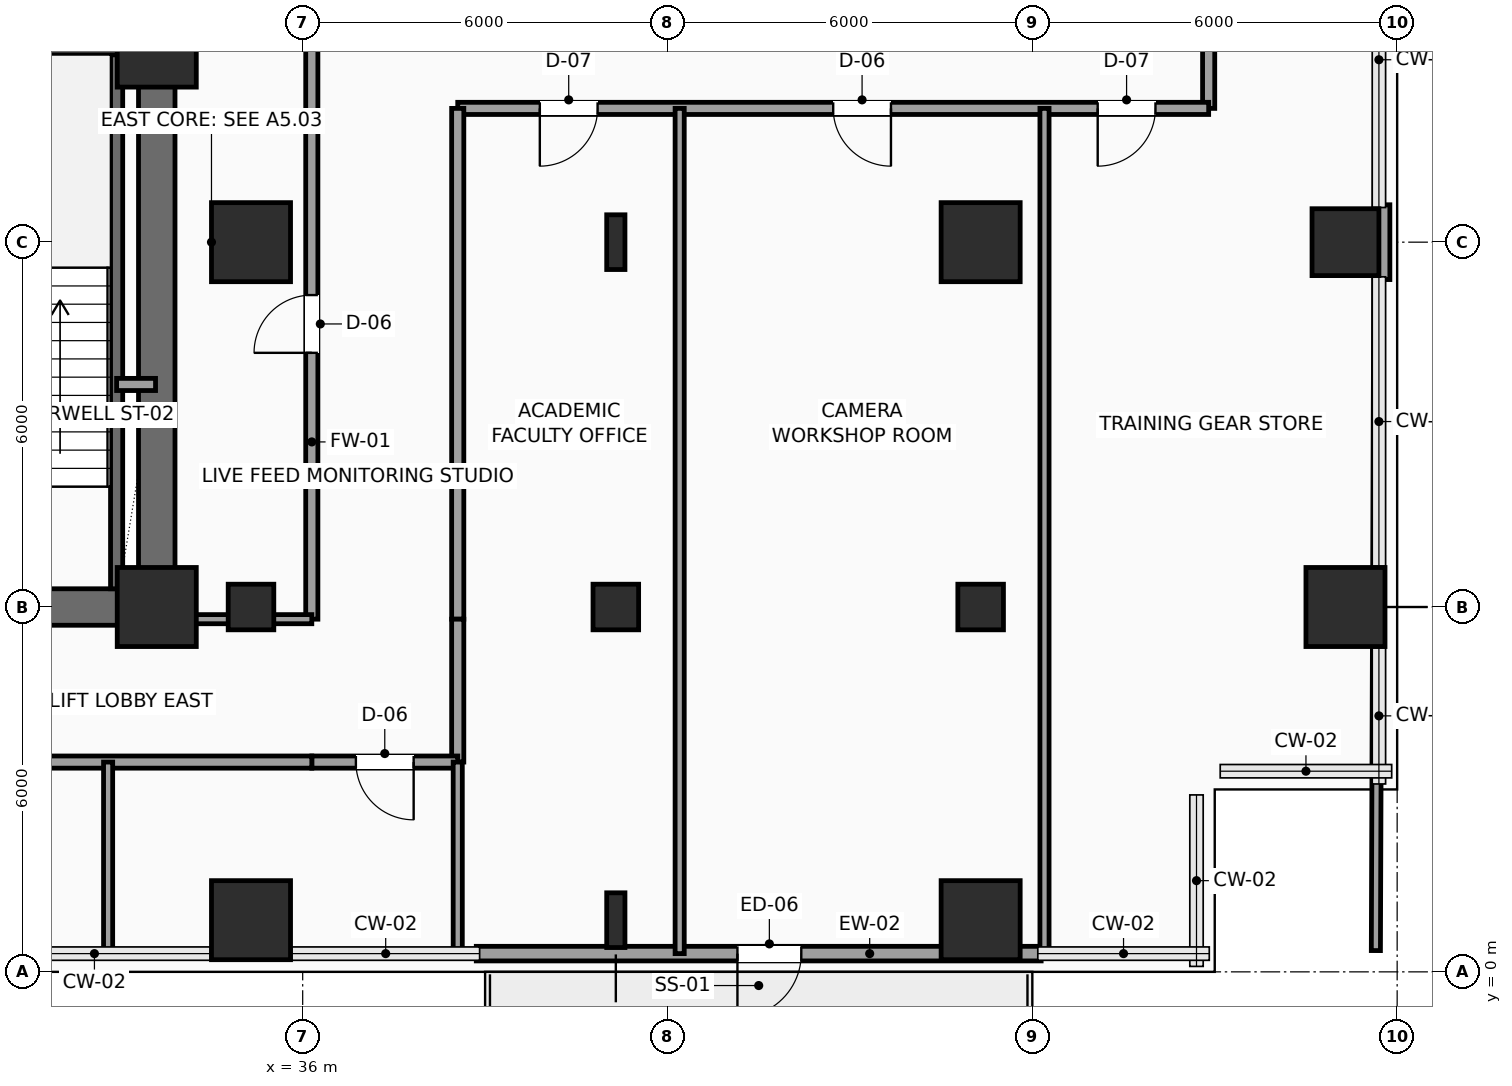
"""IFC4 building model, lengths in metres.
Left out: names, types, materials, properties, quantities, classifications, styles, units other than length and angle.
Written with IfcOpenShell. Run it as: python <this file> out.ifc"""

import sys

from ifc_helpers import new_model, si_unit, direction, frame, frame_2d, origin, origin_2d, place, context, subcontext, project, spatial, rectangle, hollow_rectangle, i_section, extrude, element, fill, save


model = new_model("IFC4")
c1 = context("Model", 3, precision=1e-05, world=origin(), true_north=direction((0.0, 1.0)))
c2 = subcontext(c1, "Body", "Model", "MODEL_VIEW")
j1 = project(units=[si_unit("LENGTHUNIT", "METRE"), si_unit("PLANEANGLEUNIT", "RADIAN")], contexts=[c1])
p1 = place(None, origin())
s1 = spatial("IfcSite", under=j1, at=p1, CompositionType="ELEMENT")
p2 = place(p1, origin())
s2 = spatial("IfcBuilding", under=s1, at=p2, CompositionType="ELEMENT")
p3 = place(p2, frame((0.0, 0.0, 55.8)))
s3 = spatial("IfcBuildingStorey", under=s2, at=p3, CompositionType="ELEMENT", Elevation=55.8)
for number, where, z_axis, x_axis in (
    (1, (33.6, 6.0, 0.0), (0.0, 0.0, 1.0), (1.0, 0.0, 0.0)),
    (2, (33.6, 15.2, 0.0), (0.0, 0.0, 1.0), (1.0, 0.0, 0.0)),
    (3, (35.15, 0.85, 0.0), (0.0, 0.0, 1.0), (1.0, 0.0, 0.0)),
):
    element("IfcColumn", number, at=place(p3, frame(where, z_axis=z_axis, x_axis=x_axis)), inside=s3, PredefinedType="COLUMN", context=c2, shape_type="SweptSolid", body=[
        extrude(rectangle(XDim=1.3, YDim=1.3, at=origin_2d()), origin(), (0.0, 0.0, 1.0), 3.9),
    ])
p4 = place(p3, frame((35.15, 6.0, 0.0), z_axis=(0.0, 0.0, 1.0), x_axis=(1.0, 0.0, 0.0)))
e4 = element("IfcColumn", 4, at=p4, inside=s3, PredefinedType="COLUMN", context=c2, shape_type="SweptSolid", body=[
    extrude(hollow_rectangle(XDim=0.75, YDim=0.75, WallThickness=0.035, InnerFilletRadius=0.035, OuterFilletRadius=0.05, at=origin_2d()), origin(), (0.0, 0.0, 1.0), 3.9),
])
p5 = place(p3, frame((35.15, 12.0, 0.0), z_axis=(0.0, 0.0, 1.0), x_axis=(1.0, 0.0, 0.0)))
e5 = element("IfcColumn", 5, at=p5, inside=s3, PredefinedType="COLUMN", context=c2, shape_type="SweptSolid", body=[
    extrude(rectangle(XDim=1.3, YDim=1.3, at=origin_2d()), origin(), (0.0, 0.0, 1.0), 3.9),
])
p6 = place(p3, frame((41.15, 0.85, 0.0), z_axis=(0.0, 0.0, 1.0), x_axis=(1.0, 0.0, 0.0)))
e6 = element("IfcColumn", 6, at=p6, inside=s3, PredefinedType="COLUMN", context=c2, shape_type="SweptSolid", body=[
    extrude(i_section(OverallWidth=0.3, OverallDepth=0.9, WebThickness=0.019, FlangeThickness=0.035, FilletRadius=0.03, at=origin_2d()), origin(), (0.0, 0.0, 1.0), 3.9),
])
p7 = place(p3, frame((41.15, 6.0, 0.0), z_axis=(0.0, 0.0, 1.0), x_axis=(1.0, 0.0, 0.0)))
e7 = element("IfcColumn", 7, at=p7, inside=s3, PredefinedType="COLUMN", context=c2, shape_type="SweptSolid", body=[
    extrude(hollow_rectangle(XDim=0.75, YDim=0.75, WallThickness=0.035, InnerFilletRadius=0.035, OuterFilletRadius=0.05, at=origin_2d()), origin(), (0.0, 0.0, 1.0), 3.9),
])
p8 = place(p3, frame((41.15, 12.0, 0.0), z_axis=(0.0, 0.0, 1.0), x_axis=(1.0, 0.0, 0.0)))
e8 = element("IfcColumn", 8, at=p8, inside=s3, PredefinedType="COLUMN", context=c2, shape_type="SweptSolid", body=[
    extrude(i_section(OverallWidth=0.3, OverallDepth=0.9, WebThickness=0.019, FlangeThickness=0.035, FilletRadius=0.03, at=origin_2d()), origin(), (0.0, 0.0, 1.0), 3.9),
])
p9 = place(p3, frame((47.15, 0.85, 0.0), z_axis=(0.0, 0.0, 1.0), x_axis=(1.0, 0.0, 0.0)))
e9 = element("IfcColumn", 9, at=p9, inside=s3, PredefinedType="COLUMN", context=c2, shape_type="SweptSolid", body=[
    extrude(rectangle(XDim=1.3, YDim=1.3, at=origin_2d()), origin(), (0.0, 0.0, 1.0), 3.9),
])
p10 = place(p3, frame((47.15, 6.0, 0.0), z_axis=(0.0, 0.0, 1.0), x_axis=(1.0, 0.0, 0.0)))
e10 = element("IfcColumn", 10, at=p10, inside=s3, PredefinedType="COLUMN", context=c2, shape_type="SweptSolid", body=[
    extrude(hollow_rectangle(XDim=0.75, YDim=0.75, WallThickness=0.035, InnerFilletRadius=0.035, OuterFilletRadius=0.05, at=origin_2d()), origin(), (0.0, 0.0, 1.0), 3.9),
])
for number, where, z_axis, x_axis in (
    (11, (47.15, 12.0, 0.0), (0.0, 0.0, 1.0), (1.0, 0.0, 0.0)),
    (12, (53.15, 6.0, 0.0), (0.0, 0.0, 1.0), (1.0, 0.0, 0.0)),
):
    element("IfcColumn", number, at=place(p3, frame(where, z_axis=z_axis, x_axis=x_axis)), inside=s3, PredefinedType="COLUMN", context=c2, shape_type="SweptSolid", body=[
        extrude(rectangle(XDim=1.3, YDim=1.3, at=origin_2d()), origin(), (0.0, 0.0, 1.0), 3.9),
    ])
p11 = place(p3, frame((53.15, 12.0, 0.0), z_axis=(0.0, 0.0, 1.0), x_axis=(1.0, 0.0, 0.0)))
e13 = element("IfcColumn", 13, at=p11, inside=s3, PredefinedType="COLUMN", context=c2, shape_type="SweptSolid", body=[
    extrude(rectangle(XDim=1.1, YDim=1.1, at=origin_2d()), origin(), (0.0, 0.0, 1.0), 3.9),
])
p12 = place(p3, frame((48.145, 0.3, 0.0), z_axis=(0.0, 0.0, 1.0), x_axis=(-1.0, 0.0, 0.0)))
e14 = element("IfcWall", 14, at=p12, inside=s3, PredefinedType="SOLIDWALL", context=c2, shape_type="SweptSolid", body=[
    extrude(rectangle(XDim=9.29, YDim=0.24, at=frame_2d((4.645, 0.0))), origin(), (0.0, 0.0, 1.0), 3.65),
])
p13 = place(p12, frame((3.945, 0.0, 0.0)))
e15 = element("IfcOpeningElement", 15, at=p13, cuts=e14, PredefinedType="OPENING", context=c2, shape_type="SweptSolid", body=[
    extrude(rectangle(XDim=1.05, YDim=2.2, at=frame_2d((0.525, 1.1))), frame((0.0, 0.13, 0.0), z_axis=(0.0, -1.0, 0.0), x_axis=(1.0, 0.0, 0.0)), (0.0, 0.0, 1.0), 0.26),
])
p14 = place(p3, frame((53.76, 12.615, 0.0), z_axis=(0.0, 0.0, 1.0), x_axis=(0.0, -1.0, 0.0)))
e16 = element("IfcWall", 16, at=p14, inside=s3, PredefinedType="SOLIDWALL", context=c2, shape_type="SweptSolid", body=[
    extrude(rectangle(XDim=1.23, YDim=0.24, at=frame_2d((0.615, 0.0))), origin(), (0.0, 0.0, 1.0), 3.65),
])
p15 = place(p3, frame((24.0, 6.0, 0.0), z_axis=(0.0, 0.0, 1.0), x_axis=(1.0, 0.0, 0.0)))
e17 = element("IfcWall", 17, at=p15, inside=s3, PredefinedType="SHEAR", context=c2, shape_type="SweptSolid", body=[
    extrude(rectangle(XDim=9.6, YDim=0.6, at=frame_2d((4.8, 0.0))), origin(), (0.0, 0.0, 1.0), 3.65),
])
p16 = place(p3, frame((33.6, 6.0, 0.0), z_axis=(0.0, 0.0, 1.0), x_axis=(0.0, 1.0, 0.0)))
e18 = element("IfcWall", 18, at=p16, inside=s3, PredefinedType="SHEAR", context=c2, shape_type="SweptSolid", body=[
    extrude(rectangle(XDim=12.0, YDim=0.6, at=frame_2d((6.0, 0.0))), origin(), (0.0, 0.0, 1.0), 3.65),
])
p17 = place(p16, frame((10.2, 0.0, 0.0)))
e19 = element("IfcOpeningElement", 19, at=p17, cuts=e18, PredefinedType="OPENING", context=c2, shape_type="SweptSolid", body=[
    extrude(rectangle(XDim=0.9, YDim=2.15, at=frame_2d((0.45, 1.075))), frame((0.0, 0.31, 0.0), z_axis=(0.0, -1.0, 0.0), x_axis=(1.0, 0.0, 0.0)), (0.0, 0.0, 1.0), 0.62),
])
p18 = place(p3, frame((32.94, 6.3, 0.0), z_axis=(0.0, 0.0, 1.0), x_axis=(0.0, 1.0, 0.0)))
e20 = element("IfcWall", 20, at=p18, inside=s3, PredefinedType="SHEAR", context=c2, shape_type="SweptSolid", body=[
    extrude(rectangle(XDim=8.88, YDim=0.2, at=frame_2d((4.44, 0.0))), origin(), (0.0, 0.0, 1.0), 3.65),
])
p19 = place(p3, frame((29.26, 15.18, 0.0), z_axis=(0.0, 0.0, 1.0), x_axis=(1.0, 0.0, 0.0)))
e21 = element("IfcWall", 21, at=p19, inside=s3, PredefinedType="SHEAR", context=c2, shape_type="SweptSolid", body=[
    extrude(rectangle(XDim=4.04, YDim=0.2, at=frame_2d((2.02, 0.0))), origin(), (0.0, 0.0, 1.0), 3.65),
])
p20 = place(p3, frame((32.94, 9.66, 0.0), z_axis=(0.0, 0.0, 1.0), x_axis=(1.0, 0.0, 0.0)))
e22 = element("IfcWall", 22, at=p20, inside=s3, PredefinedType="SOLIDWALL", context=c2, shape_type="SweptSolid", body=[
    extrude(rectangle(XDim=0.64, YDim=0.2, at=frame_2d((0.32, 0.0))), origin(), (0.0, 0.0, 1.0), 3.65),
])
p21 = place(p3, frame((36.15, 5.8, 0.0), z_axis=(0.0, 0.0, 1.0), x_axis=(0.0, 1.0, 0.0)))
e23 = element("IfcWall", 23, at=p21, inside=s3, PredefinedType="SOLIDWALL", context=c2, shape_type="SweptSolid", body=[
    extrude(rectangle(XDim=10.08, YDim=0.2, at=frame_2d((5.04, 0.0))), origin(), (0.0, 0.0, 1.0), 3.65),
])
p22 = place(p21, frame((4.38, 0.0, 0.0)))
e24 = element("IfcOpeningElement", 24, at=p22, cuts=e23, PredefinedType="OPENING", context=c2, shape_type="SweptSolid", body=[
    extrude(rectangle(XDim=0.95, YDim=2.15, at=frame_2d((0.475, 1.075))), frame((0.0, 0.11, 0.0), z_axis=(0.0, -1.0, 0.0), x_axis=(1.0, 0.0, 0.0)), (0.0, 0.0, 1.0), 0.22),
])
p23 = place(p3, frame((50.9, 16.55, 0.0), z_axis=(0.0, 0.0, 1.0), x_axis=(0.0, -1.0, 0.0)))
e25 = element("IfcWall", 25, at=p23, inside=s3, PredefinedType="SOLIDWALL", context=c2, shape_type="SweptSolid", body=[
    extrude(rectangle(XDim=2.35, YDim=0.2, at=frame_2d((1.175, 0.0))), origin(), (0.0, 0.0, 1.0), 3.65),
])
p24 = place(p3, frame((50.9, 14.2, 0.0), z_axis=(0.0, 0.0, 1.0), x_axis=(-1.0, 0.0, 0.0)))
e26 = element("IfcWall", 26, at=p24, inside=s3, PredefinedType="SOLIDWALL", context=c2, shape_type="SweptSolid", body=[
    extrude(rectangle(XDim=12.35, YDim=0.2, at=frame_2d((6.175, 0.0))), origin(), (0.0, 0.0, 1.0), 3.65),
])
p25 = place(p24, frame((10.05, 0.0, 0.0)))
e27 = element("IfcOpeningElement", 27, at=p25, cuts=e26, PredefinedType="OPENING", context=c2, shape_type="SweptSolid", body=[
    extrude(rectangle(XDim=0.95, YDim=2.15, at=frame_2d((0.475, 1.075))), frame((0.0, 0.11, 0.0), z_axis=(0.0, -1.0, 0.0), x_axis=(1.0, 0.0, 0.0)), (0.0, 0.0, 1.0), 0.22),
])
p26 = place(p24, frame((5.225, 0.0, 0.0)))
e28 = element("IfcOpeningElement", 28, at=p26, cuts=e26, PredefinedType="OPENING", context=c2, shape_type="SweptSolid", body=[
    extrude(rectangle(XDim=0.95, YDim=2.15, at=frame_2d((0.475, 1.075))), frame((0.0, 0.11, 0.0), z_axis=(0.0, -1.0, 0.0), x_axis=(1.0, 0.0, 0.0)), (0.0, 0.0, 1.0), 0.22),
])
p27 = place(p24, frame((0.875, 0.0, 0.0)))
e29 = element("IfcOpeningElement", 29, at=p27, cuts=e26, PredefinedType="OPENING", context=c2, shape_type="SweptSolid", body=[
    extrude(rectangle(XDim=0.95, YDim=2.15, at=frame_2d((0.475, 1.075))), frame((0.0, 0.11, 0.0), z_axis=(0.0, -1.0, 0.0), x_axis=(1.0, 0.0, 0.0)), (0.0, 0.0, 1.0), 0.22),
])
p28 = place(p3, frame((38.55, 14.2, 0.0), z_axis=(0.0, 0.0, 1.0), x_axis=(0.0, -1.0, 0.0)))
e30 = element("IfcWall", 30, at=p28, inside=s3, PredefinedType="SOLIDWALL", context=c2, shape_type="SweptSolid", body=[
    extrude(rectangle(XDim=8.4, YDim=0.2, at=frame_2d((4.2, 0.0))), origin(), (0.0, 0.0, 1.0), 3.65),
])
p29 = place(p3, frame((38.55, 5.8, 0.0), z_axis=(0.0, 0.0, 1.0), x_axis=(0.0, -1.0, 0.0)))
e31 = element("IfcWall", 31, at=p29, inside=s3, PredefinedType="SOLIDWALL", context=c2, shape_type="SweptSolid", body=[
    extrude(rectangle(XDim=2.35, YDim=0.2, at=frame_2d((1.175, 0.0))), origin(), (0.0, 0.0, 1.0), 3.65),
])
p30 = place(p3, frame((38.55, 3.45, 0.0), z_axis=(0.0, 0.0, 1.0), x_axis=(-1.0, 0.0, 0.0)))
e32 = element("IfcWall", 32, at=p30, inside=s3, PredefinedType="SOLIDWALL", context=c2, shape_type="SweptSolid", body=[
    extrude(rectangle(XDim=2.4, YDim=0.2, at=frame_2d((1.2, 0.0))), origin(), (0.0, 0.0, 1.0), 3.142),
])
p31 = place(p30, frame((0.725, 0.0, 0.0)))
e33 = element("IfcOpeningElement", 33, at=p31, cuts=e32, PredefinedType="OPENING", context=c2, shape_type="SweptSolid", body=[
    extrude(rectangle(XDim=0.95, YDim=2.15, at=frame_2d((0.475, 1.075))), frame((0.0, 0.11, 0.0), z_axis=(0.0, -1.0, 0.0), x_axis=(1.0, 0.0, 0.0)), (0.0, 0.0, 1.0), 0.22),
])
p32 = place(p3, frame((36.15, 3.45, 0.0), z_axis=(0.0, 0.0, 1.0), x_axis=(-1.0, 0.0, 0.0)))
e34 = element("IfcWall", 34, at=p32, inside=s3, PredefinedType="SOLIDWALL", context=c2, shape_type="SweptSolid", body=[
    extrude(rectangle(XDim=14.6, YDim=0.2, at=frame_2d((7.3, 0.0))), origin(), (0.0, 0.0, 1.0), 3.142),
])
p33 = place(p32, frame((11.3, 0.0, 0.0)))
e35 = element("IfcOpeningElement", 35, at=p33, cuts=e34, PredefinedType="OPENING", context=c2, shape_type="SweptSolid", body=[
    extrude(rectangle(XDim=0.95, YDim=2.15, at=frame_2d((0.475, 1.075))), frame((0.0, 0.11, 0.0), z_axis=(0.0, -1.0, 0.0), x_axis=(1.0, 0.0, 0.0)), (0.0, 0.0, 1.0), 0.22),
])
p34 = place(p32, frame((5.675, 0.0, 0.0)))
e36 = element("IfcOpeningElement", 36, at=p34, cuts=e34, PredefinedType="OPENING", context=c2, shape_type="SweptSolid", body=[
    extrude(rectangle(XDim=0.95, YDim=2.15, at=frame_2d((0.475, 1.075))), frame((0.0, 0.11, 0.0), z_axis=(0.0, -1.0, 0.0), x_axis=(1.0, 0.0, 0.0)), (0.0, 0.0, 1.0), 0.22),
])
for number, where, z_axis, x_axis in (
    (37, (42.2, 0.3, 0.0), (0.0, 0.0, 1.0), (0.0, 1.0, 0.0)),
    (38, (48.2, 0.3, 0.0), (0.0, 0.0, 1.0), (0.0, 1.0, 0.0)),
):
    element("IfcWall", number, at=place(p3, frame(where, z_axis=z_axis, x_axis=x_axis)), inside=s3, PredefinedType="PARTITIONING", context=c2, shape_type="SweptSolid", body=[
        extrude(rectangle(XDim=13.9, YDim=0.15, at=frame_2d((6.95, 0.0))), origin(), (0.0, 0.0, 1.0), 3.65),
    ])
p35 = place(p3, frame((53.65, 0.35, 0.0), z_axis=(0.0, 0.0, 1.0), x_axis=(0.003606251025, 0.999993497456, 0.0)))
e39 = element("IfcWall", 39, at=p35, inside=s3, PredefinedType="PARTITIONING", context=c2, shape_type="SweptSolid", body=[
    extrude(rectangle(XDim=11.035, YDim=0.15, at=frame_2d((5.518, 0.0))), origin(), (0.0, 0.0, 1.0), 3.65),
])
p36 = place(p3, frame((53.694, 12.615, 0.0), z_axis=(0.0, 0.0, 1.0), x_axis=(0.003542799701, 0.999993724265, 0.0)))
e40 = element("IfcWall", 40, at=p36, inside=s3, PredefinedType="PARTITIONING", context=c2, shape_type="SweptSolid", body=[
    extrude(rectangle(XDim=1.585, YDim=0.15, at=frame_2d((0.792, 0.0))), origin(), (0.0, 0.0, 1.0), 3.65),
])
for number, where, z_axis, x_axis in (
    (41, (32.8, 0.3, 0.0), (0.0, 0.0, 1.0), (0.0, 1.0, 0.0)),
    (42, (38.55, 0.3, 0.0), (0.0, 0.0, 1.0), (0.0, 1.0, 0.0)),
):
    element("IfcWall", number, at=place(p3, frame(where, z_axis=z_axis, x_axis=x_axis)), inside=s3, PredefinedType="PARTITIONING", context=c2, shape_type="SweptSolid", body=[
        extrude(rectangle(XDim=3.15, YDim=0.15, at=frame_2d((1.575, 0.0))), origin(), (0.0, 0.0, 1.0), 3.65),
    ])
p37 = place(p3, frame((33.65, 5.8, 0.0), z_axis=(0.0, 0.0, 1.0), x_axis=(1.0, 0.0, 0.0)))
e43 = element("IfcWall", 43, at=p37, inside=s3, PredefinedType="PARTITIONING", context=c2, shape_type="SweptSolid", body=[
    extrude(rectangle(XDim=2.5, YDim=0.15, at=frame_2d((1.25, 0.0))), origin(), (0.0, 0.0, 1.0), 2.992),
])
p38 = place(p13, origin())
e44 = element("IfcDoor", 44, at=p38, inside=s3, OperationType="SINGLE_SWING_RIGHT", PredefinedType="DOOR", context=c2, shape_type="SweptSolid", body=[
    extrude(rectangle(XDim=1.05, YDim=2.2, at=frame_2d((0.525, 1.1))), frame((0.0, 0.025, 0.0), z_axis=(0.0, -1.0, 0.0), x_axis=(1.0, 0.0, 0.0)), (0.0, 0.0, 1.0), 0.05),
])
fill(e15, e44)
p39 = place(p22, origin())
e45 = element("IfcDoor", 45, at=p39, inside=s3, OperationType="SINGLE_SWING_LEFT", PredefinedType="DOOR", context=c2, shape_type="SweptSolid", body=[
    extrude(rectangle(XDim=0.95, YDim=2.15, at=frame_2d((0.475, 1.075))), frame((0.0, 0.025, 0.0), z_axis=(0.0, -1.0, 0.0), x_axis=(1.0, 0.0, 0.0)), (0.0, 0.0, 1.0), 0.05),
])
fill(e24, e45)
p40 = place(p25, origin())
e46 = element("IfcDoor", 46, at=p40, inside=s3, OperationType="SINGLE_SWING_RIGHT", PredefinedType="DOOR", context=c2, shape_type="SweptSolid", body=[
    extrude(rectangle(XDim=0.95, YDim=2.15, at=frame_2d((0.475, 1.075))), frame((0.0, 0.025, 0.0), z_axis=(0.0, -1.0, 0.0), x_axis=(1.0, 0.0, 0.0)), (0.0, 0.0, 1.0), 0.05),
])
fill(e27, e46)
p41 = place(p26, origin())
e47 = element("IfcDoor", 47, at=p41, inside=s3, OperationType="SINGLE_SWING_LEFT", PredefinedType="DOOR", context=c2, shape_type="SweptSolid", body=[
    extrude(rectangle(XDim=0.95, YDim=2.15, at=frame_2d((0.475, 1.075))), frame((0.0, 0.025, 0.0), z_axis=(0.0, -1.0, 0.0), x_axis=(1.0, 0.0, 0.0)), (0.0, 0.0, 1.0), 0.05),
])
fill(e28, e47)
p42 = place(p27, origin())
e48 = element("IfcDoor", 48, at=p42, inside=s3, OperationType="SINGLE_SWING_RIGHT", PredefinedType="DOOR", context=c2, shape_type="SweptSolid", body=[
    extrude(rectangle(XDim=0.95, YDim=2.15, at=frame_2d((0.475, 1.075))), frame((0.0, 0.025, 0.0), z_axis=(0.0, -1.0, 0.0), x_axis=(1.0, 0.0, 0.0)), (0.0, 0.0, 1.0), 0.05),
])
fill(e29, e48)
p43 = place(p31, origin())
e49 = element("IfcDoor", 49, at=p43, inside=s3, OperationType="SINGLE_SWING_LEFT", PredefinedType="DOOR", context=c2, shape_type="SweptSolid", body=[
    extrude(rectangle(XDim=0.95, YDim=2.15, at=frame_2d((0.475, 1.075))), frame((0.0, 0.025, 0.0), z_axis=(0.0, -1.0, 0.0), x_axis=(1.0, 0.0, 0.0)), (0.0, 0.0, 1.0), 0.05),
])
fill(e33, e49)
save(model, sys.argv[1])
